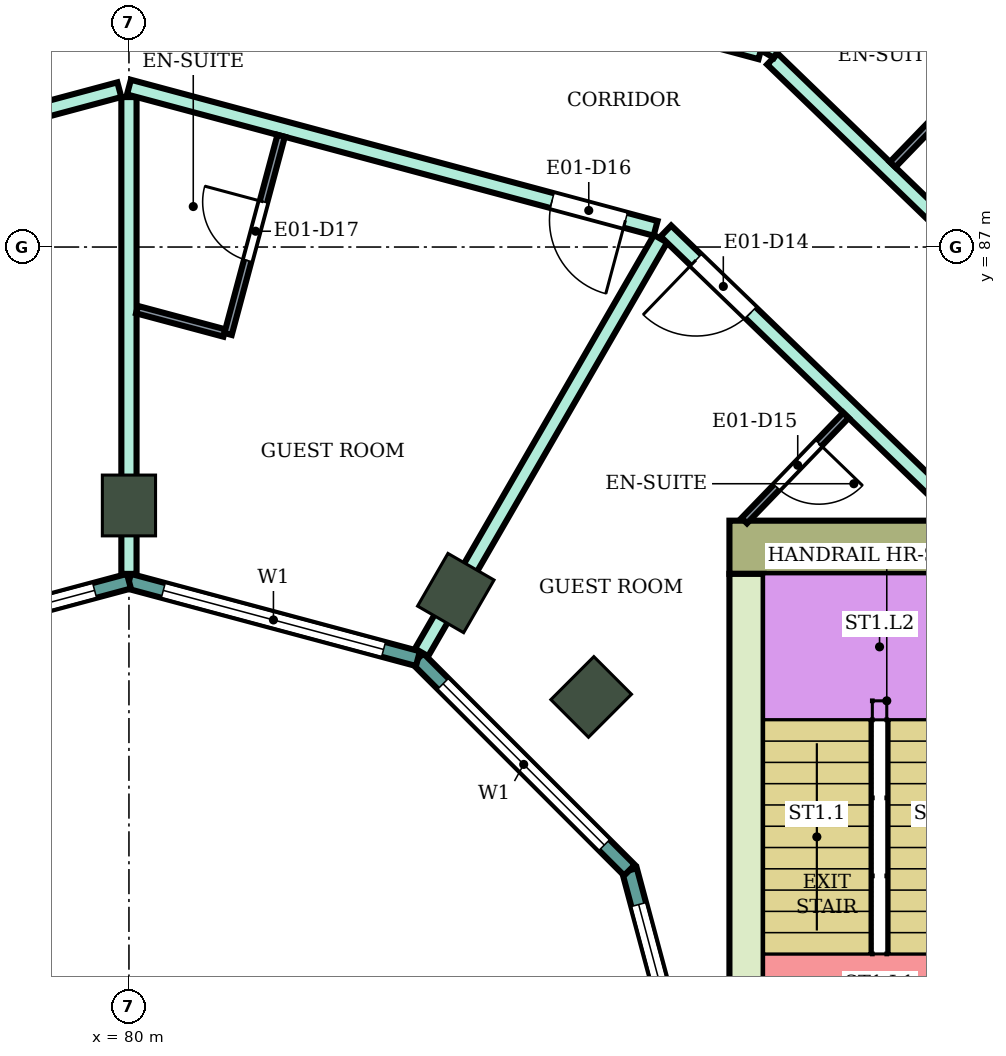
"""IFC4 building model, lengths in metres.
Left out: names, types, materials, properties, quantities, classifications, styles, units other than length and angle.
Written with IfcOpenShell. Run it as: python <this file> out.ifc"""

import sys

from ifc_helpers import new_model, si_unit, direction, frame, frame_2d, origin, origin_2d, place, context, subcontext, project, spatial, rectangle, extrude, element, fill, save


model = new_model("IFC4")
c1 = context("Model", 3, precision=1e-05, world=origin(), true_north=direction((0.0, 1.0)))
c2 = subcontext(c1, "Body", "Model", "MODEL_VIEW")
j1 = project(units=[si_unit("LENGTHUNIT", "METRE"), si_unit("PLANEANGLEUNIT", "RADIAN")], contexts=[c1])
p1 = place(None, origin())
s1 = spatial("IfcSite", under=j1, at=p1, CompositionType="ELEMENT")
p2 = place(p1, origin())
s2 = spatial("IfcBuilding", under=s1, at=p2, CompositionType="ELEMENT")
p3 = place(p2, frame((0.0, 0.0, 114.6)))
s3 = spatial("IfcBuildingStorey", under=s2, at=p3, CompositionType="ELEMENT", Elevation=114.6)
for number, where, z_axis, x_axis in (
    (1, (86.081, 81.081, 0.0), (0.0, 0.0, 1.0), (0.707, 0.707, 0.0)),
    (2, (84.3, 82.448, 0.0), (0.0, 0.0, 1.0), (0.5, 0.866, 0.0)),
    (3, (80.0, 83.6, 0.0), (0.0, 0.0, 1.0), (0.0, 1.0, 0.0)),
):
    element("IfcColumn", number, at=place(p3, frame(where, z_axis=z_axis, x_axis=x_axis)), inside=s3, PredefinedType="COLUMN", context=c2, shape_type="SweptSolid", body=[
        extrude(rectangle(XDim=0.8, YDim=0.7, at=origin_2d()), origin(), (0.0, 0.0, 1.0), 3.9),
    ])
p4 = place(p3, frame((87.9, 83.05, 0.0), z_axis=(0.0, 0.0, 1.0), x_axis=(1.0, 0.0, 0.0)))
e4 = element("IfcWall", 4, at=p4, inside=s3, PredefinedType="SHEAR", context=c2, shape_type="SweptSolid", body=[
    extrude(rectangle(XDim=14.8, YDim=0.7, at=frame_2d((7.4, 0.0))), origin(), (0.0, 0.0, 1.0), 3.58),
])
p5 = place(p4, frame((4.2, 0.0, 0.0)))
e5 = element("IfcOpeningElement", 5, at=p5, cuts=e4, PredefinedType="OPENING", context=c2, shape_type="SweptSolid", body=[
    extrude(rectangle(XDim=2.4, YDim=2.4, at=frame_2d((1.2, 1.2))), frame((0.0, 0.36, 0.0), z_axis=(0.0, -1.0, 0.0), x_axis=(1.0, 0.0, 0.0)), (0.0, 0.0, 1.0), 0.72),
])
p6 = place(p3, frame((88.125, 75.0, 0.0), z_axis=(0.0, 0.0, 1.0), x_axis=(0.0, 1.0, 0.0)))
e6 = element("IfcWall", 6, at=p6, inside=s3, PredefinedType="SHEAR", context=c2, shape_type="SweptSolid", body=[
    extrude(rectangle(XDim=7.7, YDim=0.45, at=frame_2d((3.85, 0.0))), origin(), (0.0, 0.0, 1.0), 3.58),
])
p7 = place(p3, frame((87.604, 75.0, 0.0), z_axis=(0.0, 0.0, 1.0), x_axis=(-0.258789828301, 0.965933654434, 0.0)))
e7 = element("IfcWall", 7, at=p7, inside=s3, PredefinedType="NOTDEFINED", context=c2, shape_type="SweptSolid", body=[
    extrude(rectangle(XDim=3.936, YDim=0.2, at=frame_2d((1.968, 0.0))), origin(), (0.0, 0.0, 1.0), 3.9),
])
p8 = place(p7, frame((0.468, 0.0, 0.9)))
e8 = element("IfcOpeningElement", 8, at=p8, cuts=e7, PredefinedType="OPENING", context=c2, shape_type="SweptSolid", body=[
    extrude(rectangle(XDim=3.0, YDim=2.3, at=frame_2d((1.5, 1.15))), frame((0.0, 0.11, 0.0), z_axis=(0.0, -1.0, 0.0), x_axis=(1.0, 0.0, 0.0)), (0.0, 0.0, 1.0), 0.22),
])
p9 = place(p3, frame((86.585, 78.802, 0.0), z_axis=(0.0, 0.0, 1.0), x_axis=(-0.707106781187, 0.707106781187, 0.0)))
e9 = element("IfcWall", 9, at=p9, inside=s3, PredefinedType="NOTDEFINED", context=c2, shape_type="SweptSolid", body=[
    extrude(rectangle(XDim=3.936, YDim=0.2, at=frame_2d((1.968, 0.0))), origin(), (0.0, 0.0, 1.0), 3.9),
])
p10 = place(p9, frame((0.468, 0.0, 0.9)))
e10 = element("IfcOpeningElement", 10, at=p10, cuts=e9, PredefinedType="OPENING", context=c2, shape_type="SweptSolid", body=[
    extrude(rectangle(XDim=3.0, YDim=2.3, at=frame_2d((1.5, 1.15))), frame((0.0, 0.11, 0.0), z_axis=(0.0, -1.0, 0.0), x_axis=(1.0, 0.0, 0.0)), (0.0, 0.0, 1.0), 0.22),
])
p11 = place(p3, frame((83.802, 81.585, 0.0), z_axis=(0.0, 0.0, 1.0), x_axis=(-0.965933654434, 0.258789828301, 0.0)))
e11 = element("IfcWall", 11, at=p11, inside=s3, PredefinedType="NOTDEFINED", context=c2, shape_type="SweptSolid", body=[
    extrude(rectangle(XDim=3.936, YDim=0.2, at=frame_2d((1.968, 0.0))), origin(), (0.0, 0.0, 1.0), 3.9),
])
p12 = place(p11, frame((0.468, 0.0, 0.9)))
e12 = element("IfcOpeningElement", 12, at=p12, cuts=e11, PredefinedType="OPENING", context=c2, shape_type="SweptSolid", body=[
    extrude(rectangle(XDim=3.0, YDim=2.3, at=frame_2d((1.5, 1.15))), frame((0.0, 0.11, 0.0), z_axis=(0.0, -1.0, 0.0), x_axis=(1.0, 0.0, 0.0)), (0.0, 0.0, 1.0), 0.22),
])
p13 = place(p3, frame((80.0, 82.604, 0.0), z_axis=(0.0, 0.0, 1.0), x_axis=(-0.965933654434, -0.258789828301, 0.0)))
e13 = element("IfcWall", 13, at=p13, inside=s3, PredefinedType="NOTDEFINED", context=c2, shape_type="SweptSolid", body=[
    extrude(rectangle(XDim=3.936, YDim=0.2, at=frame_2d((1.968, 0.0))), origin(), (0.0, 0.0, 1.0), 3.9),
])
p14 = place(p13, frame((0.468, 0.0, 0.9)))
e14 = element("IfcOpeningElement", 14, at=p14, cuts=e13, PredefinedType="OPENING", context=c2, shape_type="SweptSolid", body=[
    extrude(rectangle(XDim=3.0, YDim=2.3, at=frame_2d((1.5, 1.15))), frame((0.0, 0.11, 0.0), z_axis=(0.0, -1.0, 0.0), x_axis=(1.0, 0.0, 0.0)), (0.0, 0.0, 1.0), 0.22),
])
p15 = place(p3, frame((71.614, 89.55, 0.0), z_axis=(0.0, 0.0, 1.0), x_axis=(0.965967958589, 0.258661753994, 0.0)))
e15 = element("IfcWall", 15, at=p15, inside=s3, PredefinedType="PARTITIONING", context=c2, shape_type="SweptSolid", body=[
    extrude(rectangle(XDim=8.592, YDim=0.2, at=frame_2d((4.296, 0.0))), origin(), (0.0, 0.0, 1.0), 3.45),
])
p16 = place(p15, frame((0.55, 0.0, 0.0)))
e16 = element("IfcOpeningElement", 16, at=p16, cuts=e15, PredefinedType="OPENING", context=c2, shape_type="SweptSolid", body=[
    extrude(rectangle(XDim=1.0, YDim=2.1, at=frame_2d((0.5, 1.05))), frame((0.0, 0.11, 0.0), z_axis=(0.0, -1.0, 0.0), x_axis=(1.0, 0.0, 0.0)), (0.0, 0.0, 1.0), 0.22),
])
p17 = place(p3, frame((72.936, 87.211, 0.0), z_axis=(0.0, 0.0, 1.0), x_axis=(0.965917703859, 0.258849356521, 0.0)))
e17 = element("IfcWall", 17, at=p17, inside=s3, PredefinedType="PARTITIONING", context=c2, shape_type="SweptSolid", body=[
    extrude(rectangle(XDim=7.182, YDim=0.2, at=frame_2d((3.591, 0.0))), origin(), (0.0, 0.0, 1.0), 3.45),
])
p18 = place(p17, frame((2.757, 0.0, 0.0)))
e18 = element("IfcOpeningElement", 18, at=p18, cuts=e17, PredefinedType="OPENING", context=c2, shape_type="SweptSolid", body=[
    extrude(rectangle(XDim=1.8, YDim=2.1, at=frame_2d((0.9, 1.05))), frame((0.0, 0.11, 0.0), z_axis=(0.0, -1.0, 0.0), x_axis=(1.0, 0.0, 0.0)), (0.0, 0.0, 1.0), 0.22),
])
p19 = place(p3, frame((80.0, 82.7, 0.0), z_axis=(0.0, 0.0, 1.0), x_axis=(0.0, 1.0, 0.0)))
e19 = element("IfcWall", 19, at=p19, inside=s3, PredefinedType="PARTITIONING", context=c2, shape_type="SweptSolid", body=[
    extrude(rectangle(XDim=6.273, YDim=0.2, at=frame_2d((3.136, 0.0))), origin(), (0.0, 0.0, 1.0), 3.45),
])
p20 = place(p3, frame((80.0, 89.104, 0.0), z_axis=(0.0, 0.0, 1.0), x_axis=(0.965856548257, -0.259077455964, 0.0)))
e20 = element("IfcWall", 20, at=p20, inside=s3, PredefinedType="PARTITIONING", context=c2, shape_type="SweptSolid", body=[
    extrude(rectangle(XDim=7.173, YDim=0.2, at=frame_2d((3.586, 0.0))), origin(), (0.0, 0.0, 1.0), 3.45),
])
p21 = place(p20, frame((5.763, 0.0, 0.0)))
e21 = element("IfcOpeningElement", 21, at=p21, cuts=e20, PredefinedType="OPENING", context=c2, shape_type="SweptSolid", body=[
    extrude(rectangle(XDim=1.0, YDim=2.1, at=frame_2d((0.5, 1.05))), frame((0.0, 0.11, 0.0), z_axis=(0.0, -1.0, 0.0), x_axis=(1.0, 0.0, 0.0)), (0.0, 0.0, 1.0), 0.22),
])
p22 = place(p3, frame((80.0, 91.797, 0.0), z_axis=(0.0, 0.0, 1.0), x_axis=(0.965857042792, -0.259075612301, 0.0)))
e22 = element("IfcWall", 22, at=p22, inside=s3, PredefinedType="PARTITIONING", context=c2, shape_type="SweptSolid", body=[
    extrude(rectangle(XDim=8.602, YDim=0.2, at=frame_2d((4.301, 0.0))), origin(), (0.0, 0.0, 1.0), 3.45),
])
p23 = place(p22, frame((4.877, 0.0, 0.0)))
e23 = element("IfcOpeningElement", 23, at=p23, cuts=e22, PredefinedType="OPENING", context=c2, shape_type="SweptSolid", body=[
    extrude(rectangle(XDim=1.0, YDim=2.1, at=frame_2d((0.5, 1.05))), frame((0.0, 0.11, 0.0), z_axis=(0.0, -1.0, 0.0), x_axis=(1.0, 0.0, 0.0)), (0.0, 0.0, 1.0), 0.22),
])
p24 = place(p22, frame((2.817, 0.0, 0.0)))
e24 = element("IfcOpeningElement", 24, at=p24, cuts=e22, PredefinedType="OPENING", context=c2, shape_type="SweptSolid", body=[
    extrude(rectangle(XDim=1.0, YDim=2.1, at=frame_2d((0.5, 1.05))), frame((0.0, 0.11, 0.0), z_axis=(0.0, -1.0, 0.0), x_axis=(1.0, 0.0, 0.0)), (0.0, 0.0, 1.0), 0.22),
])
p25 = place(p3, frame((83.85, 81.667, 0.0), z_axis=(0.0, 0.0, 1.0), x_axis=(0.500224530691, 0.865895732115, 0.0)))
e25 = element("IfcWall", 25, at=p25, inside=s3, PredefinedType="PARTITIONING", context=c2, shape_type="SweptSolid", body=[
    extrude(rectangle(XDim=6.285, YDim=0.2, at=frame_2d((3.143, 0.0))), origin(), (0.0, 0.0, 1.0), 3.45),
])
p26 = place(p3, frame((87.064, 87.211, 0.0), z_axis=(0.0, 0.0, 1.0), x_axis=(0.719540958932, -0.694450004262, 0.0)))
e26 = element("IfcWall", 26, at=p26, inside=s3, PredefinedType="PARTITIONING", context=c2, shape_type="SweptSolid", body=[
    extrude(rectangle(XDim=5.488, YDim=0.2, at=frame_2d((2.744, 0.0))), origin(), (0.0, 0.0, 1.0), 3.45),
])
p27 = place(p26, frame((0.55, 0.0, 0.0)))
e27 = element("IfcOpeningElement", 27, at=p27, cuts=e26, PredefinedType="OPENING", context=c2, shape_type="SweptSolid", body=[
    extrude(rectangle(XDim=1.0, YDim=2.1, at=frame_2d((0.5, 1.05))), frame((0.0, 0.11, 0.0), z_axis=(0.0, -1.0, 0.0), x_axis=(1.0, 0.0, 0.0)), (0.0, 0.0, 1.0), 0.22),
])
p28 = place(p3, frame((88.466, 89.473, 0.0), z_axis=(0.0, 0.0, 1.0), x_axis=(0.719346014649, -0.694651935295, 0.0)))
e28 = element("IfcWall", 28, at=p28, inside=s3, PredefinedType="PARTITIONING", context=c2, shape_type="SweptSolid", body=[
    extrude(rectangle(XDim=6.525, YDim=0.2, at=frame_2d((3.263, 0.0))), origin(), (0.0, 0.0, 1.0), 3.45),
])
p29 = place(p28, frame((5.034, 0.0, 0.0)))
e29 = element("IfcOpeningElement", 29, at=p29, cuts=e28, PredefinedType="OPENING", context=c2, shape_type="SweptSolid", body=[
    extrude(rectangle(XDim=1.0, YDim=2.1, at=frame_2d((0.5, 1.05))), frame((0.0, 0.11, 0.0), z_axis=(0.0, -1.0, 0.0), x_axis=(1.0, 0.0, 0.0)), (0.0, 0.0, 1.0), 0.22),
])
p30 = place(p3, frame((88.398, 89.539, 0.0), z_axis=(0.0, 0.0, 1.0), x_axis=(0.500217530286, 0.865899776184, 0.0)))
e30 = element("IfcWall", 30, at=p30, inside=s3, PredefinedType="PARTITIONING", context=c2, shape_type="SweptSolid", body=[
    extrude(rectangle(XDim=9.006, YDim=0.2, at=frame_2d((4.503, 0.0))), origin(), (0.0, 0.0, 1.0), 3.45),
])
p31 = place(p3, frame((80.106, 86.177, 0.0), z_axis=(0.0, 0.0, 1.0), x_axis=(0.966002973184, -0.258530957139, 0.0)))
e31 = element("IfcWall", 31, at=p31, inside=s3, PredefinedType="PARTITIONING", context=c2, shape_type="SweptSolid", body=[
    extrude(rectangle(XDim=1.19, YDim=0.1, at=frame_2d((0.595, 0.0))), origin(), (0.0, 0.0, 1.0), 3.45),
])
p32 = place(p3, frame((81.304, 85.856, 0.0), z_axis=(0.0, 0.0, 1.0), x_axis=(0.25867580527, 0.965964195904, 0.0)))
e32 = element("IfcWall", 32, at=p32, inside=s3, PredefinedType="PARTITIONING", context=c2, shape_type="SweptSolid", body=[
    extrude(rectangle(XDim=2.699, YDim=0.1, at=frame_2d((1.35, 0.0))), origin(), (0.0, 0.0, 1.0), 3.45),
])
p33 = place(p32, frame((1.0, 0.0, 0.0)))
e33 = element("IfcOpeningElement", 33, at=p33, cuts=e32, PredefinedType="OPENING", context=c2, shape_type="SweptSolid", body=[
    extrude(rectangle(XDim=0.8, YDim=2.1, at=frame_2d((0.4, 1.05))), frame((0.0, 0.06, 0.0), z_axis=(0.0, -1.0, 0.0), x_axis=(1.0, 0.0, 0.0)), (0.0, 0.0, 1.0), 0.12),
])
p34 = place(p3, frame((88.095, 83.4, 0.0), z_axis=(0.0, 0.0, 1.0), x_axis=(0.694447472534, 0.719543402368, 0.0)))
e34 = element("IfcWall", 34, at=p34, inside=s3, PredefinedType="PARTITIONING", context=c2, shape_type="SweptSolid", body=[
    extrude(rectangle(XDim=1.926, YDim=0.1, at=frame_2d((0.963, 0.0))), origin(), (0.0, 0.0, 1.0), 3.45),
])
p35 = place(p34, frame((0.613, 0.0, 0.0)))
e35 = element("IfcOpeningElement", 35, at=p35, cuts=e34, PredefinedType="OPENING", context=c2, shape_type="SweptSolid", body=[
    extrude(rectangle(XDim=0.8, YDim=2.1, at=frame_2d((0.4, 1.05))), frame((0.0, 0.06, 0.0), z_axis=(0.0, -1.0, 0.0), x_axis=(1.0, 0.0, 0.0)), (0.0, 0.0, 1.0), 0.12),
])
p36 = place(p3, frame((90.048, 88.085, 0.0), z_axis=(0.0, 0.0, 1.0), x_axis=(0.694655834207, 0.71934224956, 0.0)))
e36 = element("IfcWall", 36, at=p36, inside=s3, PredefinedType="PARTITIONING", context=c2, shape_type="SweptSolid", body=[
    extrude(rectangle(XDim=2.7, YDim=0.1, at=frame_2d((1.35, 0.0))), origin(), (0.0, 0.0, 1.0), 3.45),
])
p37 = place(p8, origin())
e37 = element("IfcWindow", 37, at=p37, inside=s3, PartitioningType="SINGLE_PANEL", PredefinedType="WINDOW", context=c2, shape_type="SweptSolid", body=[
    extrude(rectangle(XDim=3.0, YDim=2.3, at=frame_2d((1.5, 1.15))), frame((0.0, 0.03, 0.0), z_axis=(0.0, -1.0, 0.0), x_axis=(1.0, 0.0, 0.0)), (0.0, 0.0, 1.0), 0.06),
])
fill(e8, e37)
p38 = place(p10, origin())
e38 = element("IfcWindow", 38, at=p38, inside=s3, PartitioningType="SINGLE_PANEL", PredefinedType="WINDOW", context=c2, shape_type="SweptSolid", body=[
    extrude(rectangle(XDim=3.0, YDim=2.3, at=frame_2d((1.5, 1.15))), frame((0.0, 0.03, 0.0), z_axis=(0.0, -1.0, 0.0), x_axis=(1.0, 0.0, 0.0)), (0.0, 0.0, 1.0), 0.06),
])
fill(e10, e38)
p39 = place(p12, origin())
e39 = element("IfcWindow", 39, at=p39, inside=s3, PartitioningType="SINGLE_PANEL", PredefinedType="WINDOW", context=c2, shape_type="SweptSolid", body=[
    extrude(rectangle(XDim=3.0, YDim=2.3, at=frame_2d((1.5, 1.15))), frame((0.0, 0.03, 0.0), z_axis=(0.0, -1.0, 0.0), x_axis=(1.0, 0.0, 0.0)), (0.0, 0.0, 1.0), 0.06),
])
fill(e12, e39)
p40 = place(p14, origin())
e40 = element("IfcWindow", 40, at=p40, inside=s3, PartitioningType="SINGLE_PANEL", PredefinedType="WINDOW", context=c2, shape_type="SweptSolid", body=[
    extrude(rectangle(XDim=3.0, YDim=2.3, at=frame_2d((1.5, 1.15))), frame((0.0, 0.03, 0.0), z_axis=(0.0, -1.0, 0.0), x_axis=(1.0, 0.0, 0.0)), (0.0, 0.0, 1.0), 0.06),
])
fill(e14, e40)
p41 = place(p27, frame((1.0, 0.0, 0.0), z_axis=(0.0, 0.0, 1.0), x_axis=(-1.0, 0.0, 0.0)))
e41 = element("IfcDoor", 41, at=p41, inside=s3, OperationType="SINGLE_SWING_RIGHT", PredefinedType="DOOR", context=c2, shape_type="SweptSolid", body=[
    extrude(rectangle(XDim=1.0, YDim=2.1, at=frame_2d((0.5, 1.05))), frame((0.0, 0.025, 0.0), z_axis=(0.0, -1.0, 0.0), x_axis=(1.0, 0.0, 0.0)), (0.0, 0.0, 1.0), 0.05),
])
fill(e27, e41)
p42 = place(p35, frame((0.8, 0.0, 0.0), z_axis=(0.0, 0.0, 1.0), x_axis=(-1.0, 0.0, 0.0)))
e42 = element("IfcDoor", 42, at=p42, inside=s3, OperationType="SINGLE_SWING_LEFT", PredefinedType="DOOR", context=c2, shape_type="SweptSolid", body=[
    extrude(rectangle(XDim=0.8, YDim=2.1, at=frame_2d((0.4, 1.05))), frame((0.0, 0.025, 0.0), z_axis=(0.0, -1.0, 0.0), x_axis=(1.0, 0.0, 0.0)), (0.0, 0.0, 1.0), 0.05),
])
fill(e35, e42)
p43 = place(p21, frame((1.0, 0.0, 0.0), z_axis=(0.0, 0.0, 1.0), x_axis=(-1.0, 0.0, 0.0)))
e43 = element("IfcDoor", 43, at=p43, inside=s3, OperationType="SINGLE_SWING_LEFT", PredefinedType="DOOR", context=c2, shape_type="SweptSolid", body=[
    extrude(rectangle(XDim=1.0, YDim=2.1, at=frame_2d((0.5, 1.05))), frame((0.0, 0.025, 0.0), z_axis=(0.0, -1.0, 0.0), x_axis=(1.0, 0.0, 0.0)), (0.0, 0.0, 1.0), 0.05),
])
fill(e21, e43)
p44 = place(p33, origin())
e44 = element("IfcDoor", 44, at=p44, inside=s3, OperationType="SINGLE_SWING_RIGHT", PredefinedType="DOOR", context=c2, shape_type="SweptSolid", body=[
    extrude(rectangle(XDim=0.8, YDim=2.1, at=frame_2d((0.4, 1.05))), frame((0.0, 0.025, 0.0), z_axis=(0.0, -1.0, 0.0), x_axis=(1.0, 0.0, 0.0)), (0.0, 0.0, 1.0), 0.05),
])
fill(e33, e44)
save(model, sys.argv[1])
